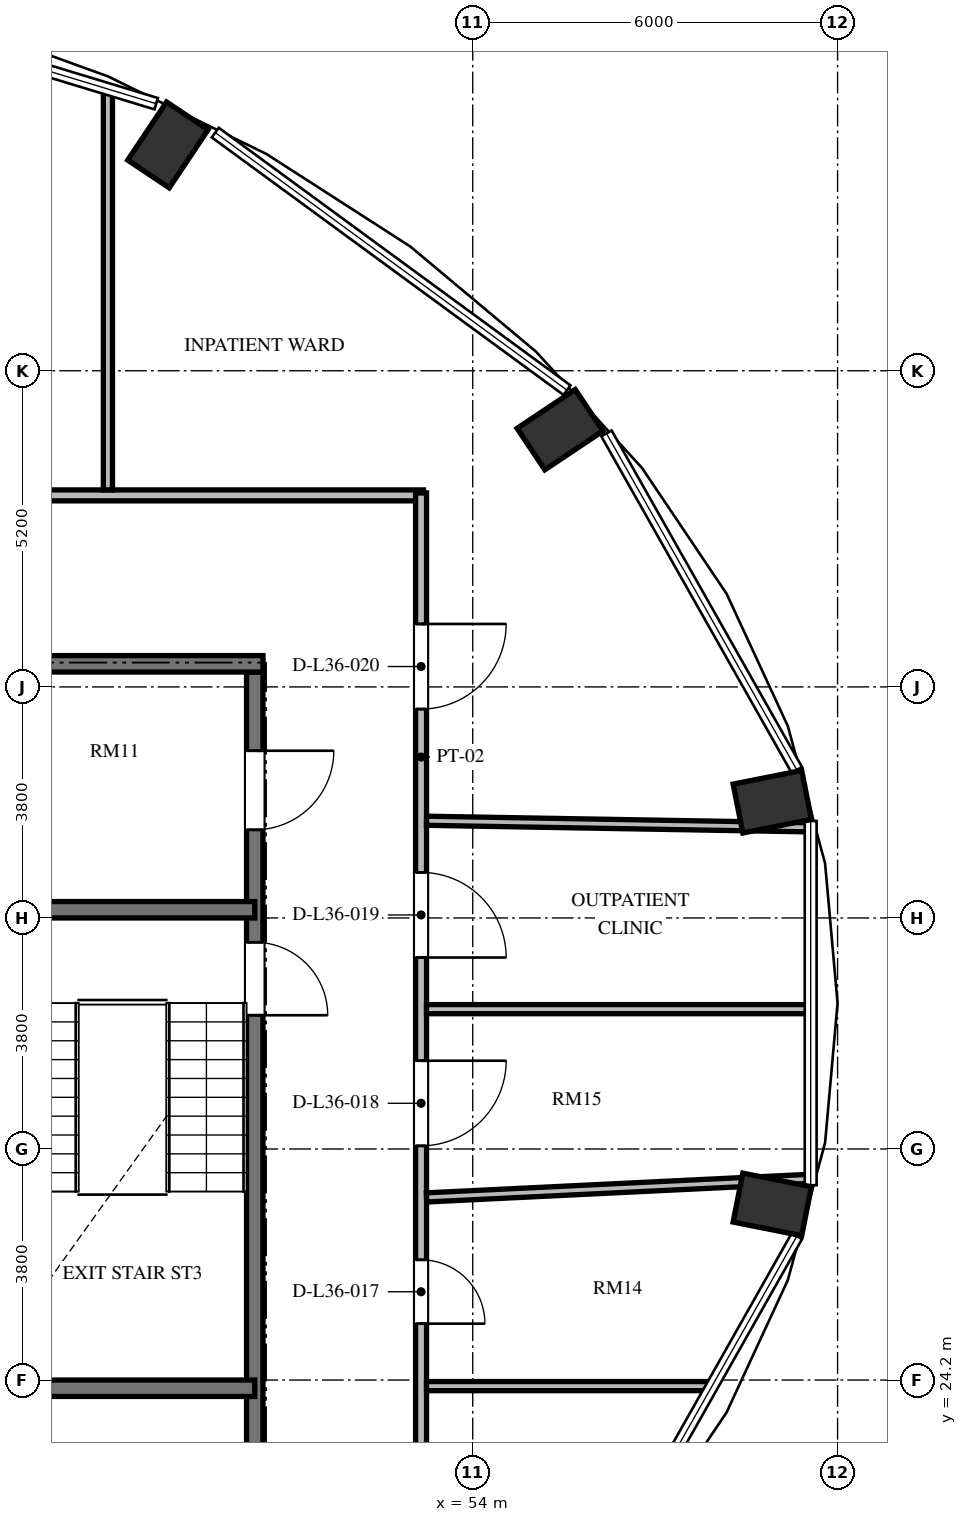
"""IFC4 building model, lengths in metres.
Left out: names, types, materials, properties, quantities, classifications, styles, units other than length and angle.
Written with IfcOpenShell. Run it as: python <this file> out.ifc"""

import sys

from ifc_helpers import new_model, si_unit, direction, frame, frame_2d, origin, origin_2d, place, context, subcontext, project, spatial, rectangle, extrude, element, fill, save


model = new_model("IFC4")
c1 = context("Model", 3, precision=1e-05, world=origin(), true_north=direction((0.0, 1.0)))
c2 = subcontext(c1, "Body", "Model", "MODEL_VIEW")
j1 = project(units=[si_unit("LENGTHUNIT", "METRE"), si_unit("PLANEANGLEUNIT", "RADIAN")], contexts=[c1])
p1 = place(None, origin())
s1 = spatial("IfcSite", under=j1, at=p1, CompositionType="ELEMENT")
p2 = place(p1, origin())
s2 = spatial("IfcBuilding", under=s1, at=p2, CompositionType="ELEMENT")
p3 = place(p2, frame((0.0, 0.0, 141.936)))
s3 = spatial("IfcBuildingStorey", under=s2, at=p3, CompositionType="ELEMENT", Elevation=141.936)
for number, where, z_axis, x_axis in (
    (1, (58.926, 27.088, 0.0), (0.0, 0.0, 1.0), (0.981, -0.195, 0.0)),
    (2, (58.926, 33.712, 0.0), (0.0, 0.0, 1.0), (0.981, 0.195, 0.0)),
    (3, (55.436, 39.831, 0.0), (0.0, 0.0, 1.0), (0.831, 0.556, 0.0)),
    (4, (48.987, 44.514, 0.0), (0.0, 0.0, 1.0), (0.556, 0.831, 0.0)),
):
    element("IfcColumn", number, at=place(p3, frame(where, z_axis=z_axis, x_axis=x_axis)), inside=s3, PredefinedType="COLUMN", context=c2, shape_type="SweptSolid", body=[
        extrude(rectangle(XDim=1.15, YDim=0.82, at=origin_2d()), origin(), (0.0, 0.0, 1.0), 3.648),
    ])
p4 = place(p3, frame((50.415, 35.845, 0.0), z_axis=(0.0, 0.0, 1.0), x_axis=(0.0, -1.0, 0.0)))
e5 = element("IfcWall", 5, at=p4, inside=s3, PredefinedType="SHEAR", context=c2, shape_type="SweptSolid", body=[
    extrude(rectangle(XDim=15.825, YDim=0.27, at=frame_2d((7.913, 0.0))), origin(), (0.0, 0.0, 1.0), 3.648),
])
p5 = place(p4, frame((4.445, 0.0, 0.0)))
e6 = element("IfcOpeningElement", 6, at=p5, cuts=e5, PredefinedType="OPENING", context=c2, shape_type="SweptSolid", body=[
    extrude(rectangle(XDim=1.2, YDim=2.15, at=frame_2d((0.6, 1.075))), frame((0.0, 0.145, 0.0), z_axis=(0.0, -1.0, 0.0), x_axis=(1.0, 0.0, 0.0)), (0.0, 0.0, 1.0), 0.29),
])
p6 = place(p4, frame((1.295, 0.0, 0.0)))
e7 = element("IfcOpeningElement", 7, at=p6, cuts=e5, PredefinedType="OPENING", context=c2, shape_type="SweptSolid", body=[
    extrude(rectangle(XDim=1.3, YDim=2.2, at=frame_2d((0.65, 1.1))), frame((0.0, 0.145, 0.0), z_axis=(0.0, -1.0, 0.0), x_axis=(1.0, 0.0, 0.0)), (0.0, 0.0, 1.0), 0.29),
])
p7 = place(p4, frame((13.095, 0.0, 0.0)))
e8 = element("IfcOpeningElement", 8, at=p7, cuts=e5, PredefinedType="OPENING", context=c2, shape_type="SweptSolid", body=[
    extrude(rectangle(XDim=1.3, YDim=2.2, at=frame_2d((0.65, 1.1))), frame((0.0, 0.145, 0.0), z_axis=(0.0, -1.0, 0.0), x_axis=(1.0, 0.0, 0.0)), (0.0, 0.0, 1.0), 0.29),
])
p8 = place(p3, frame((46.0, 35.98, 0.0), z_axis=(0.0, 0.0, 1.0), x_axis=(1.0, 0.0, 0.0)))
e9 = element("IfcWall", 9, at=p8, inside=s3, PredefinedType="SHEAR", context=c2, shape_type="SweptSolid", body=[
    extrude(rectangle(XDim=4.55, YDim=0.27, at=frame_2d((2.275, 0.0))), origin(), (0.0, 0.0, 1.0), 3.648),
])
for number, where, z_axis, x_axis in (
    (10, (45.7, 31.935, 0.0), (0.0, 0.0, 1.0), (1.0, 0.0, 0.0)),
    (11, (45.7, 24.065, 0.0), (0.0, 0.0, 1.0), (1.0, 0.0, 0.0)),
):
    element("IfcWall", number, at=place(p3, frame(where, z_axis=z_axis, x_axis=x_axis)), inside=s3, PredefinedType="SHEAR", context=c2, shape_type="SweptSolid", body=[
        extrude(rectangle(XDim=4.715, YDim=0.27, at=frame_2d((2.357, 0.0))), origin(), (0.0, 0.0, 1.0), 3.648),
    ])
p9 = place(p3, frame((39.46, 38.75, 0.0), z_axis=(0.0, 0.0, 1.0), x_axis=(1.0, 0.0, 0.0)))
e12 = element("IfcWall", 12, at=p9, inside=s3, PredefinedType="PARTITIONING", context=c2, shape_type="SweptSolid", body=[
    extrude(rectangle(XDim=13.73, YDim=0.18, at=frame_2d((6.865, 0.0))), origin(), (0.0, 0.0, 1.0), 3.428),
])
p10 = place(p9, frame((5.59, 0.0, 0.0)))
e13 = element("IfcOpeningElement", 13, at=p10, cuts=e12, PredefinedType="OPENING", context=c2, shape_type="SweptSolid", body=[
    extrude(rectangle(XDim=1.4, YDim=2.2, at=frame_2d((0.7, 1.1))), frame((0.0, 0.1, 0.0), z_axis=(0.0, -1.0, 0.0), x_axis=(1.0, 0.0, 0.0)), (0.0, 0.0, 1.0), 0.2),
])
p11 = place(p3, frame((53.15, 38.79, 0.0), z_axis=(0.0, 0.0, 1.0), x_axis=(0.0, -1.0, 0.0)))
e14 = element("IfcWall", 14, at=p11, inside=s3, PredefinedType="PARTITIONING", context=c2, shape_type="SweptSolid", body=[
    extrude(rectangle(XDim=17.374, YDim=0.18, at=frame_2d((8.687, 0.0))), origin(), (0.0, 0.0, 1.0), 3.428),
])
p12 = place(p11, frame((12.613, 0.0, 0.0)))
e15 = element("IfcOpeningElement", 15, at=p12, cuts=e14, PredefinedType="OPENING", context=c2, shape_type="SweptSolid", body=[
    extrude(rectangle(XDim=1.05, YDim=2.15, at=frame_2d((0.525, 1.075))), frame((0.0, 0.1, 0.0), z_axis=(0.0, -1.0, 0.0), x_axis=(1.0, 0.0, 0.0)), (0.0, 0.0, 1.0), 0.2),
])
p13 = place(p11, frame((9.338, 0.0, 0.0)))
e16 = element("IfcOpeningElement", 16, at=p13, cuts=e14, PredefinedType="OPENING", context=c2, shape_type="SweptSolid", body=[
    extrude(rectangle(XDim=1.4, YDim=2.2, at=frame_2d((0.7, 1.1))), frame((0.0, 0.1, 0.0), z_axis=(0.0, -1.0, 0.0), x_axis=(1.0, 0.0, 0.0)), (0.0, 0.0, 1.0), 0.2),
])
p14 = place(p11, frame((6.241, 0.0, 0.0)))
e17 = element("IfcOpeningElement", 17, at=p14, cuts=e14, PredefinedType="OPENING", context=c2, shape_type="SweptSolid", body=[
    extrude(rectangle(XDim=1.4, YDim=2.2, at=frame_2d((0.7, 1.1))), frame((0.0, 0.1, 0.0), z_axis=(0.0, -1.0, 0.0), x_axis=(1.0, 0.0, 0.0)), (0.0, 0.0, 1.0), 0.2),
])
p15 = place(p11, frame((2.155, 0.0, 0.0)))
e18 = element("IfcOpeningElement", 18, at=p15, cuts=e14, PredefinedType="OPENING", context=c2, shape_type="SweptSolid", body=[
    extrude(rectangle(XDim=1.4, YDim=2.2, at=frame_2d((0.7, 1.1))), frame((0.0, 0.1, 0.0), z_axis=(0.0, -1.0, 0.0), x_axis=(1.0, 0.0, 0.0)), (0.0, 0.0, 1.0), 0.2),
])
p16 = place(p3, frame((53.24, 24.1, 0.0), z_axis=(0.0, 0.0, 1.0), x_axis=(1.0, 0.0, 0.0)))
e19 = element("IfcWall", 19, at=p16, inside=s3, PredefinedType="PARTITIONING", context=c2, shape_type="SweptSolid", body=[
    extrude(rectangle(XDim=4.687, YDim=0.15, at=frame_2d((2.343, 0.0))), origin(), (0.0, 0.0, 1.0), 3.428),
])
p17 = place(p3, frame((53.24, 27.204, 0.0), z_axis=(0.0, 0.0, 1.0), x_axis=(0.99882763896, 0.0484081362, 0.0)))
e20 = element("IfcWall", 20, at=p17, inside=s3, PredefinedType="PARTITIONING", context=c2, shape_type="SweptSolid", body=[
    extrude(rectangle(XDim=6.329, YDim=0.15, at=frame_2d((3.165, 0.0))), origin(), (0.0, 0.0, 1.0), 3.428),
])
p18 = place(p3, frame((53.24, 30.3, 0.0), z_axis=(0.0, 0.0, 1.0), x_axis=(1.0, 0.0, 0.0)))
e21 = element("IfcWall", 21, at=p18, inside=s3, PredefinedType="PARTITIONING", context=c2, shape_type="SweptSolid", body=[
    extrude(rectangle(XDim=6.307, YDim=0.15, at=frame_2d((3.154, 0.0))), origin(), (0.0, 0.0, 1.0), 3.428),
])
p19 = place(p3, frame((53.24, 33.399, 0.0), z_axis=(0.0, 0.0, 1.0), x_axis=(0.999852374284, -0.017182247791, 0.0)))
e22 = element("IfcWall", 22, at=p19, inside=s3, PredefinedType="PARTITIONING", context=c2, shape_type="SweptSolid", body=[
    extrude(rectangle(XDim=6.323, YDim=0.15, at=frame_2d((3.162, 0.0))), origin(), (0.0, 0.0, 1.0), 3.428),
])
p20 = place(p3, frame((48.0, 38.84, 0.0), z_axis=(0.0, 0.0, 1.0), x_axis=(0.0, 1.0, 0.0)))
e23 = element("IfcWall", 23, at=p20, inside=s3, PredefinedType="PARTITIONING", context=c2, shape_type="SweptSolid", body=[
    extrude(rectangle(XDim=6.578, YDim=0.15, at=frame_2d((3.289, 0.0))), origin(), (0.0, 0.0, 1.0), 3.428),
])
p21 = place(p5, origin())
e24 = element("IfcDoor", 24, at=p21, inside=s3, OperationType="SINGLE_SWING_RIGHT", PredefinedType="DOOR", context=c2, shape_type="SweptSolid", body=[
    extrude(rectangle(XDim=1.2, YDim=2.15, at=frame_2d((0.6, 1.075))), frame((0.0, 0.025, 0.0), z_axis=(0.0, -1.0, 0.0), x_axis=(1.0, 0.0, 0.0)), (0.0, 0.0, 1.0), 0.05),
])
fill(e6, e24)
p22 = place(p6, origin())
e25 = element("IfcDoor", 25, at=p22, inside=s3, OperationType="SINGLE_SWING_LEFT", PredefinedType="DOOR", context=c2, shape_type="SweptSolid", body=[
    extrude(rectangle(XDim=1.3, YDim=2.2, at=frame_2d((0.65, 1.1))), frame((0.0, 0.025, 0.0), z_axis=(0.0, -1.0, 0.0), x_axis=(1.0, 0.0, 0.0)), (0.0, 0.0, 1.0), 0.05),
])
fill(e7, e25)
p23 = place(p12, origin())
e26 = element("IfcDoor", 26, at=p23, inside=s3, OperationType="SINGLE_SWING_RIGHT", PredefinedType="DOOR", context=c2, shape_type="SweptSolid", body=[
    extrude(rectangle(XDim=1.05, YDim=2.15, at=frame_2d((0.525, 1.075))), frame((0.0, 0.025, 0.0), z_axis=(0.0, -1.0, 0.0), x_axis=(1.0, 0.0, 0.0)), (0.0, 0.0, 1.0), 0.05),
])
fill(e15, e26)
p24 = place(p13, origin())
e27 = element("IfcDoor", 27, at=p24, inside=s3, OperationType="SINGLE_SWING_LEFT", PredefinedType="DOOR", context=c2, shape_type="SweptSolid", body=[
    extrude(rectangle(XDim=1.4, YDim=2.2, at=frame_2d((0.7, 1.1))), frame((0.0, 0.025, 0.0), z_axis=(0.0, -1.0, 0.0), x_axis=(1.0, 0.0, 0.0)), (0.0, 0.0, 1.0), 0.05),
])
fill(e16, e27)
p25 = place(p14, origin())
e28 = element("IfcDoor", 28, at=p25, inside=s3, OperationType="SINGLE_SWING_RIGHT", PredefinedType="DOOR", context=c2, shape_type="SweptSolid", body=[
    extrude(rectangle(XDim=1.4, YDim=2.2, at=frame_2d((0.7, 1.1))), frame((0.0, 0.025, 0.0), z_axis=(0.0, -1.0, 0.0), x_axis=(1.0, 0.0, 0.0)), (0.0, 0.0, 1.0), 0.05),
])
fill(e17, e28)
p26 = place(p15, origin())
e29 = element("IfcDoor", 29, at=p26, inside=s3, OperationType="SINGLE_SWING_LEFT", PredefinedType="DOOR", context=c2, shape_type="SweptSolid", body=[
    extrude(rectangle(XDim=1.4, YDim=2.2, at=frame_2d((0.7, 1.1))), frame((0.0, 0.025, 0.0), z_axis=(0.0, -1.0, 0.0), x_axis=(1.0, 0.0, 0.0)), (0.0, 0.0, 1.0), 0.05),
])
fill(e18, e29)
save(model, sys.argv[1])
